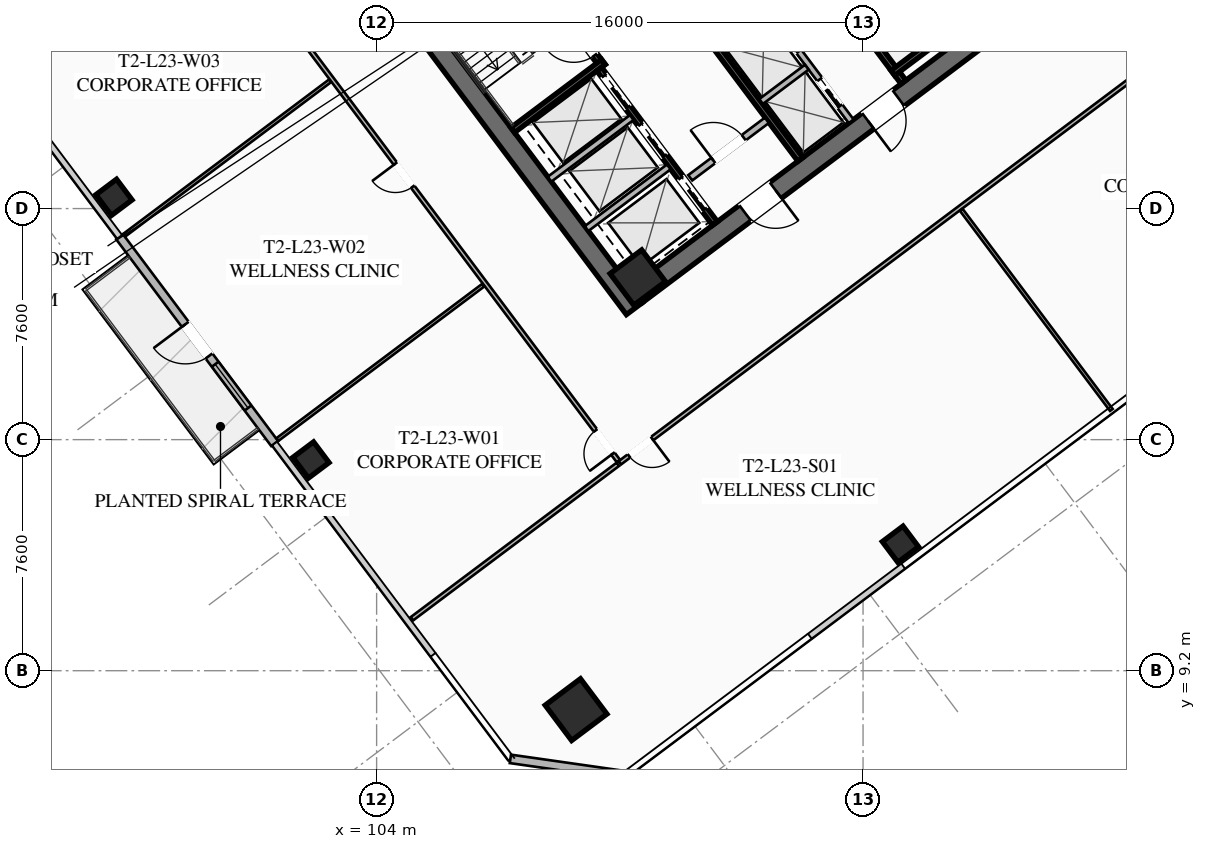
"""IFC4 building model, lengths in metres.
Left out: names, types, materials, properties, quantities, classifications, styles, units other than length and angle.
Written with IfcOpenShell. Run it as: python <this file> out.ifc"""

import sys

from ifc_helpers import new_model, si_unit, direction, frame, frame_2d, origin, origin_2d, place, context, subcontext, project, spatial, rectangle, hollow_rectangle, extrude, element, fill, save


model = new_model("IFC4")
c1 = context("Model", 3, precision=1e-05, world=origin(), true_north=direction((0.0, 1.0)))
c2 = subcontext(c1, "Body", "Model", "MODEL_VIEW")
j1 = project(units=[si_unit("LENGTHUNIT", "METRE"), si_unit("PLANEANGLEUNIT", "RADIAN")], contexts=[c1])
p1 = place(None, origin())
s1 = spatial("IfcSite", under=j1, at=p1, CompositionType="ELEMENT")
p2 = place(p1, origin())
s2 = spatial("IfcBuilding", under=s1, at=p2, CompositionType="ELEMENT")
p3 = place(p2, frame((0.0, 0.0, 88.5)))
s3 = spatial("IfcBuildingStorey", under=s2, at=p3, CompositionType="ELEMENT", Elevation=88.5)
p4 = place(p3, frame((112.476, 21.107, 0.0), z_axis=(0.0, 0.0, 1.0), x_axis=(-0.600005007985, 0.799996243986, 0.0)))
e1 = element("IfcWall", 1, at=p4, inside=s3, PredefinedType="SHEAR", context=c2, shape_type="SweptSolid", body=[
    extrude(rectangle(XDim=15.6, YDim=0.65, at=frame_2d((7.8, 0.0))), origin(), (0.0, 0.0, 1.0), 3.55),
])
p5 = place(p3, frame((124.429, 30.478, 0.0), z_axis=(0.0, 0.0, 1.0), x_axis=(-0.799998028465, -0.600002628705, 0.0)))
e2 = element("IfcWall", 2, at=p5, inside=s3, PredefinedType="SHEAR", context=c2, shape_type="SweptSolid", body=[
    extrude(rectangle(XDim=14.86, YDim=0.65, at=frame_2d((7.43, 0.0))), origin(), (0.0, 0.0, 1.0), 3.55),
])
p6 = place(p5, frame((9.13, 0.0, 0.0)))
e3 = element("IfcOpeningElement", 3, at=p6, cuts=e2, PredefinedType="OPENING", context=c2, shape_type="SweptSolid", body=[
    extrude(rectangle(XDim=1.25, YDim=2.25, at=frame_2d((0.625, 1.125))), frame((0.0, 0.335, 0.0), z_axis=(0.0, -1.0, 0.0), x_axis=(1.0, 0.0, 0.0)), (0.0, 0.0, 1.0), 0.67),
])
p7 = place(p5, frame((4.08, 0.0, 0.0)))
e4 = element("IfcOpeningElement", 4, at=p7, cuts=e2, PredefinedType="OPENING", context=c2, shape_type="SweptSolid", body=[
    extrude(rectangle(XDim=1.25, YDim=2.25, at=frame_2d((0.625, 1.125))), frame((0.0, 0.335, 0.0), z_axis=(0.0, -1.0, 0.0), x_axis=(1.0, 0.0, 0.0)), (0.0, 0.0, 1.0), 0.67),
])
p8 = place(p3, frame((112.59, 22.13, 0.0), z_axis=(0.0, 0.0, 1.0), x_axis=(0.799999996291, 0.600000004945, 0.0)))
e5 = element("IfcColumn", 5, at=p8, inside=s3, PredefinedType="COLUMN", context=c2, shape_type="SweptSolid", body=[
    extrude(hollow_rectangle(XDim=1.3, YDim=1.3, WallThickness=0.05, at=origin_2d()), origin(), (0.0, 0.0, 1.0), 3.35),
])
p9 = place(p3, frame((110.56, 7.92, 0.0), z_axis=(0.0, 0.0, 1.0), x_axis=(0.799999996291, 0.600000004945, 0.0)))
e6 = element("IfcColumn", 6, at=p9, inside=s3, PredefinedType="COLUMN", context=c2, shape_type="SweptSolid", body=[
    extrude(hollow_rectangle(XDim=1.45, YDim=1.45, WallThickness=0.055, at=origin_2d()), origin(), (0.0, 0.0, 1.0), 3.35),
])
for number, where, z_axis, x_axis in (
    (7, (121.23, 13.36, 0.0), (0.0, 0.0, 1.0), (0.8, 0.6, 0.0)),
    (8, (95.36, 24.77, 0.0), (0.0, 0.0, 1.0), (0.8, 0.6, 0.0)),
    (9, (101.84, 16.13, 0.0), (0.0, 0.0, 1.0), (0.8, 0.6, 0.0)),
):
    element("IfcColumn", number, at=place(p3, frame(where, z_axis=z_axis, x_axis=x_axis)), inside=s3, PredefinedType="COLUMN", context=c2, shape_type="SweptSolid", body=[
        extrude(hollow_rectangle(XDim=0.85, YDim=0.85, WallThickness=0.035, at=origin_2d()), origin(), (0.0, 0.0, 1.0), 3.35),
    ])
p10 = place(p3, frame((100.646, 16.672, 0.0), z_axis=(0.0, 0.0, 1.0), x_axis=(-0.600018382406, 0.799986212866, 0.0)))
e10 = element("IfcWall", 10, at=p10, inside=s3, PredefinedType="SOLIDWALL", context=c2, shape_type="SweptSolid", body=[
    extrude(rectangle(XDim=8.5, YDim=0.28, at=frame_2d((4.25, 0.0))), origin(), (0.0, 0.0, 1.0), 3.35),
])
p11 = place(p10, frame((3.6, 0.0, 0.0)))
e11 = element("IfcOpeningElement", 11, at=p11, cuts=e10, PredefinedType="OPENING", context=c2, shape_type="SweptSolid", body=[
    extrude(rectangle(XDim=1.3, YDim=2.15, at=frame_2d((0.65, 1.075))), frame((0.0, 0.15, 0.0), z_axis=(0.0, -1.0, 0.0), x_axis=(1.0, 0.0, 0.0)), (0.0, 0.0, 1.0), 0.3),
])
p12 = place(p10, frame((1.46, 0.0, 0.85)))
e12 = element("IfcOpeningElement", 12, at=p12, cuts=e10, PredefinedType="OPENING", context=c2, shape_type="SweptSolid", body=[
    extrude(rectangle(XDim=1.8, YDim=1.92, at=frame_2d((0.9, 0.96))), frame((0.0, 0.15, 0.0), z_axis=(0.0, -1.0, 0.0), x_axis=(1.0, 0.0, 0.0)), (0.0, 0.0, 1.0), 0.3),
])
p13 = place(p3, frame((112.18, 5.76, 0.0), z_axis=(0.0, 0.0, 1.0), x_axis=(-0.989948214866, 0.141430307517, 0.0)))
e13 = element("IfcWall", 13, at=p13, inside=s3, PredefinedType="SOLIDWALL", context=c2, shape_type="SweptSolid", body=[
    extrude(rectangle(XDim=3.818, YDim=0.28, at=frame_2d((1.909, 0.0))), origin(), (0.0, 0.0, 1.0), 3.35),
])
p14 = place(p3, frame((111.44, 29.08, 0.0), z_axis=(0.0, 0.0, 1.0), x_axis=(-0.600009827119, 0.799992629566, 0.0)))
e14 = element("IfcWall", 14, at=p14, inside=s3, PredefinedType="SHEAR", context=c2, shape_type="SweptSolid", body=[
    extrude(rectangle(XDim=7.95, YDim=0.2, at=frame_2d((3.975, 0.0))), origin(), (0.0, 0.0, 1.0), 3.35),
])
p15 = place(p14, frame((0.45, 0.0, 0.0)))
e15 = element("IfcOpeningElement", 15, at=p15, cuts=e14, PredefinedType="OPENING", context=c2, shape_type="SweptSolid", body=[
    extrude(rectangle(XDim=1.15, YDim=2.2, at=frame_2d((0.575, 1.1))), frame((0.0, 0.11, 0.0), z_axis=(0.0, -1.0, 0.0), x_axis=(1.0, 0.0, 0.0)), (0.0, 0.0, 1.0), 0.22),
])
p16 = place(p3, frame((108.476, 26.982, 0.0), z_axis=(0.0, 0.0, 1.0), x_axis=(0.799984290658, 0.600020945218, 0.0)))
e16 = element("IfcWall", 16, at=p16, inside=s3, PredefinedType="SHEAR", context=c2, shape_type="SweptSolid", body=[
    extrude(rectangle(XDim=3.73, YDim=0.2, at=frame_2d((1.865, 0.0))), origin(), (0.0, 0.0, 1.0), 3.35),
])
p17 = place(p3, frame((116.56, 34.92, 0.0), z_axis=(0.0, 0.0, 1.0), x_axis=(0.600009827119, -0.799992629566, 0.0)))
e17 = element("IfcWall", 17, at=p17, inside=s3, PredefinedType="SHEAR", context=c2, shape_type="SweptSolid", body=[
    extrude(rectangle(XDim=7.95, YDim=0.2, at=frame_2d((3.975, 0.0))), origin(), (0.0, 0.0, 1.0), 3.35),
])
p18 = place(p17, frame((0.45, 0.0, 0.0)))
e18 = element("IfcOpeningElement", 18, at=p18, cuts=e17, PredefinedType="OPENING", context=c2, shape_type="SweptSolid", body=[
    extrude(rectangle(XDim=1.15, YDim=2.2, at=frame_2d((0.575, 1.1))), frame((0.0, 0.11, 0.0), z_axis=(0.0, -1.0, 0.0), x_axis=(1.0, 0.0, 0.0)), (0.0, 0.0, 1.0), 0.22),
])
p19 = place(p3, frame((120.98, 28.86, 0.0), z_axis=(0.0, 0.0, 1.0), x_axis=(0.800039270442, 0.59994763584, 0.0)))
e19 = element("IfcWall", 19, at=p19, inside=s3, PredefinedType="SHEAR", context=c2, shape_type="SweptSolid", body=[
    extrude(rectangle(XDim=3.73, YDim=0.2, at=frame_2d((1.865, 0.0))), origin(), (0.0, 0.0, 1.0), 3.35),
])
p20 = place(p3, frame((117.938, 26.016, 0.0), z_axis=(0.0, 0.0, 1.0), x_axis=(-0.600005463273, 0.799995902516, 0.0)))
e20 = element("IfcWall", 20, at=p20, inside=s3, PredefinedType="SHEAR", context=c2, shape_type="SweptSolid", body=[
    extrude(rectangle(XDim=14.3, YDim=0.2, at=frame_2d((7.15, 0.0))), origin(), (0.0, 0.0, 1.0), 3.35),
])
p21 = place(p3, frame((114.316, 25.412, 0.0), z_axis=(0.0, 0.0, 1.0), x_axis=(0.800018601094, 0.59997519774, 0.0)))
e21 = element("IfcWall", 21, at=p21, inside=s3, PredefinedType="SOLIDWALL", context=c2, shape_type="SweptSolid", body=[
    extrude(rectangle(XDim=3.15, YDim=0.22, at=frame_2d((1.575, 0.0))), origin(), (0.0, 0.0, 1.0), 2.703),
])
p22 = place(p21, frame((0.95, 0.0, 0.0)))
e22 = element("IfcOpeningElement", 22, at=p22, cuts=e21, PredefinedType="OPENING", context=c2, shape_type="SweptSolid", body=[
    extrude(rectangle(XDim=1.25, YDim=2.25, at=frame_2d((0.625, 1.125))), frame((0.0, 0.12, 0.0), z_axis=(0.0, -1.0, 0.0), x_axis=(1.0, 0.0, 0.0)), (0.0, 0.0, 1.0), 0.24),
])
p23 = place(p3, frame((115.13, 23.91, 0.0), z_axis=(0.0, 0.0, 1.0), x_axis=(-0.599975393228, 0.800018454488, 0.0)))
e23 = element("IfcWall", 23, at=p23, inside=s3, PredefinedType="SHEAR", context=c2, shape_type="SweptSolid", body=[
    extrude(rectangle(XDim=6.35, YDim=0.2, at=frame_2d((3.175, 0.0))), origin(), (0.0, 0.0, 1.0), 3.35),
])
p24 = place(p23, frame((4.775, 0.0, 0.0)))
e24 = element("IfcOpeningElement", 24, at=p24, cuts=e23, PredefinedType="OPENING", context=c2, shape_type="SweptSolid", body=[
    extrude(rectangle(XDim=1.3, YDim=2.25, at=frame_2d((0.65, 1.125))), frame((0.0, 0.11, 0.0), z_axis=(0.0, -1.0, 0.0), x_axis=(1.0, 0.0, 0.0)), (0.0, 0.0, 1.0), 0.22),
])
p25 = place(p23, frame((2.775, 0.0, 0.0)))
e25 = element("IfcOpeningElement", 25, at=p25, cuts=e23, PredefinedType="OPENING", context=c2, shape_type="SweptSolid", body=[
    extrude(rectangle(XDim=1.3, YDim=2.25, at=frame_2d((0.65, 1.125))), frame((0.0, 0.11, 0.0), z_axis=(0.0, -1.0, 0.0), x_axis=(1.0, 0.0, 0.0)), (0.0, 0.0, 1.0), 0.22),
])
p26 = place(p23, frame((0.575, 0.0, 0.0)))
e26 = element("IfcOpeningElement", 26, at=p26, cuts=e23, PredefinedType="OPENING", context=c2, shape_type="SweptSolid", body=[
    extrude(rectangle(XDim=1.3, YDim=2.25, at=frame_2d((0.65, 1.125))), frame((0.0, 0.11, 0.0), z_axis=(0.0, -1.0, 0.0), x_axis=(1.0, 0.0, 0.0)), (0.0, 0.0, 1.0), 0.22),
])
for number, where, z_axis, x_axis in (
    (27, (110.906, 23.742, 0.0), (0.0, 0.0, 1.0), (0.8, 0.6, 0.0)),
    (28, (109.688, 25.366, 0.0), (0.0, 0.0, 1.0), (0.8, 0.6, 0.0)),
):
    element("IfcWall", number, at=place(p3, frame(where, z_axis=z_axis, x_axis=x_axis)), inside=s3, PredefinedType="SOLIDWALL", context=c2, shape_type="SweptSolid", body=[
        extrude(rectangle(XDim=3.38, YDim=0.2, at=frame_2d((1.69, 0.0))), origin(), (0.0, 0.0, 1.0), 3.35),
    ])
p27 = place(p3, frame((119.61, 27.27, 0.0), z_axis=(0.0, 0.0, 1.0), x_axis=(-0.600011488909, 0.79999138319, 0.0)))
e29 = element("IfcWall", 29, at=p27, inside=s3, PredefinedType="SOLIDWALL", context=c2, shape_type="SweptSolid", body=[
    extrude(rectangle(XDim=6.8, YDim=0.2, at=frame_2d((3.4, 0.0))), origin(), (0.0, 0.0, 1.0), 3.35),
])
p28 = place(p27, frame((0.625, 0.0, 0.0)))
e30 = element("IfcOpeningElement", 30, at=p28, cuts=e29, PredefinedType="OPENING", context=c2, shape_type="SweptSolid", body=[
    extrude(rectangle(XDim=1.1, YDim=2.2, at=frame_2d((0.55, 1.1))), frame((0.0, 0.11, 0.0), z_axis=(0.0, -1.0, 0.0), x_axis=(1.0, 0.0, 0.0)), (0.0, 0.0, 1.0), 0.22),
])
p29 = place(p27, frame((2.875, 0.0, 0.0)))
e31 = element("IfcOpeningElement", 31, at=p29, cuts=e29, PredefinedType="OPENING", context=c2, shape_type="SweptSolid", body=[
    extrude(rectangle(XDim=1.1, YDim=2.2, at=frame_2d((0.55, 1.1))), frame((0.0, 0.11, 0.0), z_axis=(0.0, -1.0, 0.0), x_axis=(1.0, 0.0, 0.0)), (0.0, 0.0, 1.0), 0.22),
])
p30 = place(p27, frame((5.125, 0.0, 0.0)))
e32 = element("IfcOpeningElement", 32, at=p30, cuts=e29, PredefinedType="OPENING", context=c2, shape_type="SweptSolid", body=[
    extrude(rectangle(XDim=1.1, YDim=2.2, at=frame_2d((0.55, 1.1))), frame((0.0, 0.11, 0.0), z_axis=(0.0, -1.0, 0.0), x_axis=(1.0, 0.0, 0.0)), (0.0, 0.0, 1.0), 0.22),
])
p31 = place(p3, frame((116.646, 27.922, 0.0), z_axis=(0.0, 0.0, 1.0), x_axis=(0.8, 0.6, 0.0)))
e33 = element("IfcWall", 33, at=p31, inside=s3, PredefinedType="SOLIDWALL", context=c2, shape_type="SweptSolid", body=[
    extrude(rectangle(XDim=1.88, YDim=0.2, at=frame_2d((0.94, 0.0))), origin(), (0.0, 0.0, 1.0), 3.35),
])
p32 = place(p3, frame((134.582, 32.974, 0.0), z_axis=(0.0, 0.0, 1.0), x_axis=(-0.799995848831, -0.600005534853, 0.0)))
e34 = element("IfcWall", 34, at=p32, inside=s3, PredefinedType="PARTITIONING", context=c2, shape_type="SweptSolid", body=[
    extrude(rectangle(XDim=28.23, YDim=0.135, at=frame_2d((14.115, 0.0))), origin(), (0.0, 0.0, 1.0), 2.703),
])
p33 = place(p32, frame((26.9, 0.0, 0.0)))
e35 = element("IfcOpeningElement", 35, at=p33, cuts=e34, PredefinedType="OPENING", context=c2, shape_type="SweptSolid", body=[
    extrude(rectangle(XDim=0.95, YDim=2.05, at=frame_2d((0.475, 1.025))), frame((0.0, 0.077, 0.0), z_axis=(0.0, -1.0, 0.0), x_axis=(1.0, 0.0, 0.0)), (0.0, 0.0, 1.0), 0.155),
])
p34 = place(p32, frame((0.38, 0.0, 0.0)))
e36 = element("IfcOpeningElement", 36, at=p34, cuts=e34, PredefinedType="OPENING", context=c2, shape_type="SweptSolid", body=[
    extrude(rectangle(XDim=0.95, YDim=2.05, at=frame_2d((0.475, 1.025))), frame((0.0, 0.077, 0.0), z_axis=(0.0, -1.0, 0.0), x_axis=(1.0, 0.0, 0.0)), (0.0, 0.0, 1.0), 0.155),
])
p35 = place(p3, frame((128.168, 17.776, 0.0), z_axis=(0.0, 0.0, 1.0), x_axis=(-0.599985761145, 0.800010678943, 0.0)))
e37 = element("IfcWall", 37, at=p35, inside=s3, PredefinedType="PARTITIONING", context=c2, shape_type="SweptSolid", body=[
    extrude(rectangle(XDim=8.23, YDim=0.11, at=frame_2d((4.115, 0.0))), origin(), (0.0, 0.0, 1.0), 2.703),
])
p36 = place(p3, frame((111.95, 16.1, 0.0), z_axis=(0.0, 0.0, 1.0), x_axis=(-0.600001750902, 0.799998686821, 0.0)))
e38 = element("IfcWall", 38, at=p36, inside=s3, PredefinedType="PARTITIONING", context=c2, shape_type="SweptSolid", body=[
    extrude(rectangle(XDim=22.31, YDim=0.135, at=frame_2d((11.155, 0.0))), origin(), (0.0, 0.0, 1.0), 2.703),
])
p37 = place(p36, frame((0.3, 0.0, 0.0)))
e39 = element("IfcOpeningElement", 39, at=p37, cuts=e38, PredefinedType="OPENING", context=c2, shape_type="SweptSolid", body=[
    extrude(rectangle(XDim=0.95, YDim=2.05, at=frame_2d((0.475, 1.025))), frame((0.0, 0.077, 0.0), z_axis=(0.0, -1.0, 0.0), x_axis=(1.0, 0.0, 0.0)), (0.0, 0.0, 1.0), 0.155),
])
p38 = place(p36, frame((11.272, 0.0, 0.0)))
e40 = element("IfcOpeningElement", 40, at=p38, cuts=e38, PredefinedType="OPENING", context=c2, shape_type="SweptSolid", body=[
    extrude(rectangle(XDim=0.95, YDim=2.05, at=frame_2d((0.475, 1.025))), frame((0.0, 0.077, 0.0), z_axis=(0.0, -1.0, 0.0), x_axis=(1.0, 0.0, 0.0)), (0.0, 0.0, 1.0), 0.155),
])
p39 = place(p36, frame((21.06, 0.0, 0.0)))
e41 = element("IfcOpeningElement", 41, at=p39, cuts=e38, PredefinedType="OPENING", context=c2, shape_type="SweptSolid", body=[
    extrude(rectangle(XDim=0.95, YDim=2.05, at=frame_2d((0.475, 1.025))), frame((0.0, 0.077, 0.0), z_axis=(0.0, -1.0, 0.0), x_axis=(1.0, 0.0, 0.0)), (0.0, 0.0, 1.0), 0.155),
])
p40 = place(p3, frame((98.452, 33.964, 0.0), z_axis=(0.0, 0.0, 1.0), x_axis=(-0.799993082085, -0.600009223776, 0.0)))
e42 = element("IfcWall", 42, at=p40, inside=s3, PredefinedType="PARTITIONING", context=c2, shape_type="SweptSolid", body=[
    extrude(rectangle(XDim=8.47, YDim=0.135, at=frame_2d((4.235, 0.0))), origin(), (0.0, 0.0, 1.0), 2.703),
])
p41 = place(p3, frame((105.158, 10.906, 0.0), z_axis=(0.0, 0.0, 1.0), x_axis=(0.800003458838, 0.599995388188, 0.0)))
e43 = element("IfcWall", 43, at=p41, inside=s3, PredefinedType="PARTITIONING", context=c2, shape_type="SweptSolid", body=[
    extrude(rectangle(XDim=8.47, YDim=0.135, at=frame_2d((4.235, 0.0))), origin(), (0.0, 0.0, 1.0), 2.703),
])
for number, where, z_axis, x_axis in (
    (44, (100.736, 16.802, 0.0), (0.0, 0.0, 1.0), (0.8, 0.6, 0.0)),
    (45, (95.696, 23.522, 0.0), (0.0, 0.0, 1.0), (0.8, 0.6, 0.0)),
):
    element("IfcWall", number, at=place(p3, frame(where, z_axis=z_axis, x_axis=x_axis)), inside=s3, PredefinedType="PARTITIONING", context=c2, shape_type="SweptSolid", body=[
        extrude(rectangle(XDim=8.47, YDim=0.11, at=frame_2d((4.235, 0.0))), origin(), (0.0, 0.0, 1.0), 2.703),
    ])
p42 = place(p11, origin())
e46 = element("IfcDoor", 46, at=p42, inside=s3, OperationType="SINGLE_SWING_RIGHT", PredefinedType="DOOR", context=c2, shape_type="SweptSolid", body=[
    extrude(rectangle(XDim=1.3, YDim=2.15, at=frame_2d((0.65, 1.075))), frame((0.0, 0.025, 0.0), z_axis=(0.0, -1.0, 0.0), x_axis=(1.0, 0.0, 0.0)), (0.0, 0.0, 1.0), 0.05),
])
fill(e11, e46)
p43 = place(p12, origin())
e47 = element("IfcWindow", 47, at=p43, inside=s3, PartitioningType="SINGLE_PANEL", PredefinedType="WINDOW", context=c2, shape_type="SweptSolid", body=[
    extrude(rectangle(XDim=1.8, YDim=1.92, at=frame_2d((0.9, 0.96))), frame((0.0, 0.03, 0.0), z_axis=(0.0, -1.0, 0.0), x_axis=(1.0, 0.0, 0.0)), (0.0, 0.0, 1.0), 0.06),
])
fill(e12, e47)
p44 = place(p6, origin())
e48 = element("IfcDoor", 48, at=p44, inside=s3, OperationType="SINGLE_SWING_LEFT", PredefinedType="DOOR", context=c2, shape_type="SweptSolid", body=[
    extrude(rectangle(XDim=1.25, YDim=2.25, at=frame_2d((0.625, 1.125))), frame((0.0, 0.025, 0.0), z_axis=(0.0, -1.0, 0.0), x_axis=(1.0, 0.0, 0.0)), (0.0, 0.0, 1.0), 0.05),
])
fill(e3, e48)
p45 = place(p7, origin())
e49 = element("IfcDoor", 49, at=p45, inside=s3, OperationType="SINGLE_SWING_RIGHT", PredefinedType="DOOR", context=c2, shape_type="SweptSolid", body=[
    extrude(rectangle(XDim=1.25, YDim=2.25, at=frame_2d((0.625, 1.125))), frame((0.0, 0.025, 0.0), z_axis=(0.0, -1.0, 0.0), x_axis=(1.0, 0.0, 0.0)), (0.0, 0.0, 1.0), 0.05),
])
fill(e4, e49)
p46 = place(p15, origin())
e50 = element("IfcDoor", 50, at=p46, inside=s3, OperationType="SINGLE_SWING_RIGHT", PredefinedType="DOOR", context=c2, shape_type="SweptSolid", body=[
    extrude(rectangle(XDim=1.15, YDim=2.2, at=frame_2d((0.575, 1.1))), frame((0.0, 0.025, 0.0), z_axis=(0.0, -1.0, 0.0), x_axis=(1.0, 0.0, 0.0)), (0.0, 0.0, 1.0), 0.05),
])
fill(e15, e50)
p47 = place(p22, origin())
e51 = element("IfcDoor", 51, at=p47, inside=s3, OperationType="SINGLE_SWING_LEFT", PredefinedType="DOOR", context=c2, shape_type="SweptSolid", body=[
    extrude(rectangle(XDim=1.25, YDim=2.25, at=frame_2d((0.625, 1.125))), frame((0.0, 0.025, 0.0), z_axis=(0.0, -1.0, 0.0), x_axis=(1.0, 0.0, 0.0)), (0.0, 0.0, 1.0), 0.05),
])
fill(e22, e51)
p48 = place(p33, origin())
e52 = element("IfcDoor", 52, at=p48, inside=s3, OperationType="SINGLE_SWING_LEFT", PredefinedType="DOOR", context=c2, shape_type="SweptSolid", body=[
    extrude(rectangle(XDim=0.95, YDim=2.05, at=frame_2d((0.475, 1.025))), frame((0.0, 0.025, 0.0), z_axis=(0.0, -1.0, 0.0), x_axis=(1.0, 0.0, 0.0)), (0.0, 0.0, 1.0), 0.05),
])
fill(e35, e52)
p49 = place(p37, origin())
e53 = element("IfcDoor", 53, at=p49, inside=s3, OperationType="SINGLE_SWING_LEFT", PredefinedType="DOOR", context=c2, shape_type="SweptSolid", body=[
    extrude(rectangle(XDim=0.95, YDim=2.05, at=frame_2d((0.475, 1.025))), frame((0.0, 0.025, 0.0), z_axis=(0.0, -1.0, 0.0), x_axis=(1.0, 0.0, 0.0)), (0.0, 0.0, 1.0), 0.05),
])
fill(e39, e53)
p50 = place(p38, origin())
e54 = element("IfcDoor", 54, at=p50, inside=s3, OperationType="SINGLE_SWING_RIGHT", PredefinedType="DOOR", context=c2, shape_type="SweptSolid", body=[
    extrude(rectangle(XDim=0.95, YDim=2.05, at=frame_2d((0.475, 1.025))), frame((0.0, 0.025, 0.0), z_axis=(0.0, -1.0, 0.0), x_axis=(1.0, 0.0, 0.0)), (0.0, 0.0, 1.0), 0.05),
])
fill(e40, e54)
p51 = place(p24, origin())
e55 = element("IfcDoor", 55, at=p51, inside=s3, OperationType="SLIDING_TO_LEFT", PredefinedType="DOOR", context=c2, shape_type="SweptSolid", body=[
    extrude(rectangle(XDim=1.3, YDim=2.25, at=frame_2d((0.65, 1.125))), frame((0.0, 0.025, 0.0), z_axis=(0.0, -1.0, 0.0), x_axis=(1.0, 0.0, 0.0)), (0.0, 0.0, 1.0), 0.05),
])
fill(e24, e55)
p52 = place(p25, origin())
e56 = element("IfcDoor", 56, at=p52, inside=s3, OperationType="SLIDING_TO_LEFT", PredefinedType="DOOR", context=c2, shape_type="SweptSolid", body=[
    extrude(rectangle(XDim=1.3, YDim=2.25, at=frame_2d((0.65, 1.125))), frame((0.0, 0.025, 0.0), z_axis=(0.0, -1.0, 0.0), x_axis=(1.0, 0.0, 0.0)), (0.0, 0.0, 1.0), 0.05),
])
fill(e25, e56)
p53 = place(p26, origin())
e57 = element("IfcDoor", 57, at=p53, inside=s3, OperationType="SLIDING_TO_LEFT", PredefinedType="DOOR", context=c2, shape_type="SweptSolid", body=[
    extrude(rectangle(XDim=1.3, YDim=2.25, at=frame_2d((0.65, 1.125))), frame((0.0, 0.025, 0.0), z_axis=(0.0, -1.0, 0.0), x_axis=(1.0, 0.0, 0.0)), (0.0, 0.0, 1.0), 0.05),
])
fill(e26, e57)
p54 = place(p28, origin())
e58 = element("IfcDoor", 58, at=p54, inside=s3, OperationType="SLIDING_TO_LEFT", PredefinedType="DOOR", context=c2, shape_type="SweptSolid", body=[
    extrude(rectangle(XDim=1.1, YDim=2.2, at=frame_2d((0.55, 1.1))), frame((0.0, 0.025, 0.0), z_axis=(0.0, -1.0, 0.0), x_axis=(1.0, 0.0, 0.0)), (0.0, 0.0, 1.0), 0.05),
])
fill(e30, e58)
save(model, sys.argv[1])
